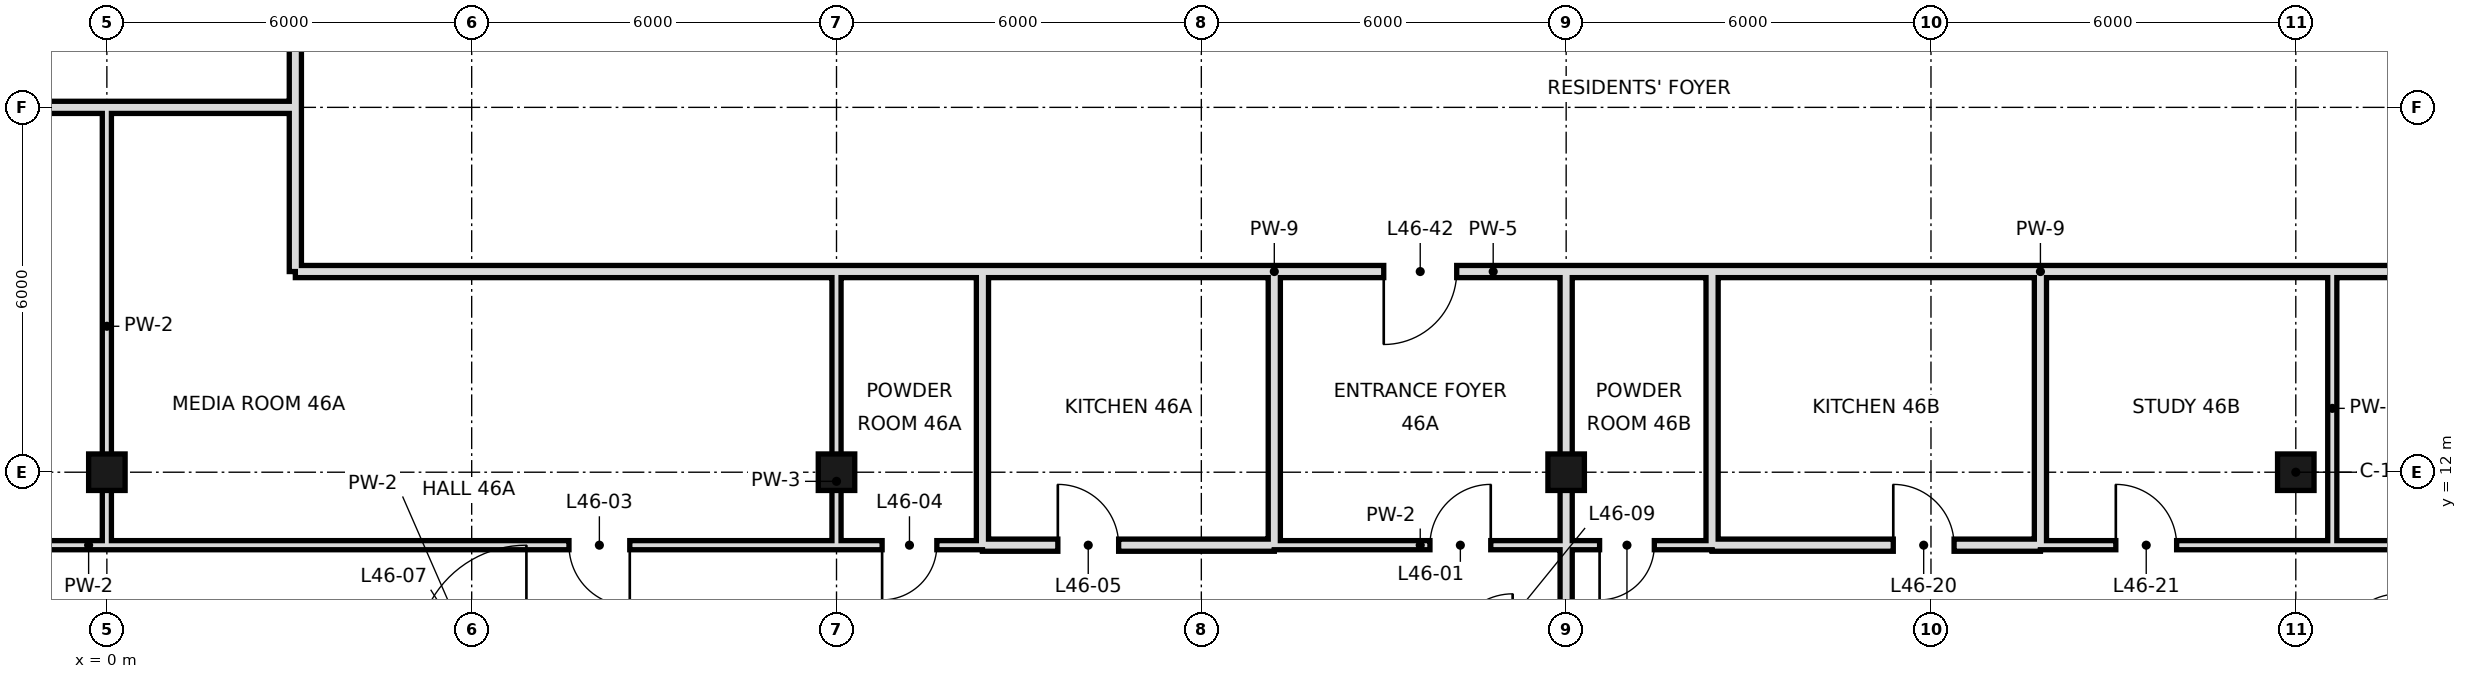
"""IFC4 building model, lengths in metres.
Left out: names, types, materials, properties, quantities, classifications, styles, units other than length and angle.
Written with IfcOpenShell. Run it as: python <this file> out.ifc"""

import sys

from ifc_helpers import new_model, si_unit, direction, frame, frame_2d, origin, origin_2d, place, context, subcontext, project, spatial, rectangle, hollow_rectangle, extrude, element, fill, save


model = new_model("IFC4")
c1 = context("Model", 3, precision=1e-05, world=origin(), true_north=direction((0.0, 1.0)))
c2 = subcontext(c1, "Body", "Model", "MODEL_VIEW")
j1 = project(units=[si_unit("LENGTHUNIT", "METRE"), si_unit("PLANEANGLEUNIT", "RADIAN")], contexts=[c1])
p1 = place(None, origin())
s1 = spatial("IfcSite", under=j1, at=p1, CompositionType="ELEMENT")
p2 = place(p1, origin())
s2 = spatial("IfcBuilding", under=s1, at=p2, CompositionType="ELEMENT")
p3 = place(p2, frame((0.0, 0.0, 199.2)))
s3 = spatial("IfcBuildingStorey", under=s2, at=p3, CompositionType="ELEMENT", Elevation=199.2)
for number, where, z_axis, x_axis in (
    (1, (0.0, 12.0, 0.0), (0.0, 0.0, 1.0), (1.0, 0.0, 0.0)),
    (2, (12.0, 12.0, 0.0), (0.0, 0.0, 1.0), (1.0, 0.0, 0.0)),
    (3, (24.0, 12.0, 0.0), (0.0, 0.0, 1.0), (1.0, 0.0, 0.0)),
    (4, (36.0, 12.0, 0.0), (0.0, 0.0, 1.0), (1.0, 0.0, 0.0)),
):
    element("IfcColumn", number, at=place(p3, frame(where, z_axis=z_axis, x_axis=x_axis)), inside=s3, PredefinedType="COLUMN", context=c2, shape_type="SweptSolid", body=[
        extrude(hollow_rectangle(XDim=0.6, YDim=0.6, WallThickness=0.028, at=origin_2d()), origin(), (0.0, 0.0, 1.0), 3.6),
    ])
p4 = place(p3, frame((0.0, 10.8, 0.0), z_axis=(0.0, 0.0, 1.0), x_axis=(0.0, 1.0, 0.0)))
e5 = element("IfcWall", 5, at=p4, inside=s3, PredefinedType="PARTITIONING", context=c2, shape_type="SweptSolid", body=[
    extrude(rectangle(XDim=7.2, YDim=0.15, at=frame_2d((3.6, 0.0))), origin(), (0.0, 0.0, 1.0), 2.72),
])
p5 = place(p3, frame((12.0, 10.8, 0.0), z_axis=(0.0, 0.0, 1.0), x_axis=(0.0, 1.0, 0.0)))
e6 = element("IfcWall", 6, at=p5, inside=s3, PredefinedType="PARTITIONING", context=c2, shape_type="SweptSolid", body=[
    extrude(rectangle(XDim=4.5, YDim=0.15, at=frame_2d((2.25, 0.0))), origin(), (0.0, 0.0, 1.0), 2.72),
])
for number, where, z_axis, x_axis in (
    (7, (14.4, 10.8, 0.0), (0.0, 0.0, 1.0), (0.0, 1.0, 0.0)),
    (8, (19.2, 10.8, 0.0), (0.0, 0.0, 1.0), (0.0, 1.0, 0.0)),
):
    element("IfcWall", number, at=place(p3, frame(where, z_axis=z_axis, x_axis=x_axis)), inside=s3, PredefinedType="SOLIDWALL", context=c2, shape_type="SweptSolid", body=[
        extrude(rectangle(XDim=4.5, YDim=0.2, at=frame_2d((2.25, 0.0))), origin(), (0.0, 0.0, 1.0), 2.72),
    ])
p6 = place(p3, frame((24.0, 0.0, 0.0), z_axis=(0.0, 0.0, 1.0), x_axis=(0.0, 1.0, 0.0)))
e9 = element("IfcWall", 9, at=p6, inside=s3, PredefinedType="SOLIDWALL", context=c2, shape_type="SweptSolid", body=[
    extrude(rectangle(XDim=15.3, YDim=0.2, at=frame_2d((7.65, 0.0))), origin(), (0.0, 0.0, 1.0), 2.72),
])
p7 = place(p3, frame((26.4, 10.8, 0.0), z_axis=(0.0, 0.0, 1.0), x_axis=(0.0, 1.0, 0.0)))
e10 = element("IfcWall", 10, at=p7, inside=s3, PredefinedType="SOLIDWALL", context=c2, shape_type="SweptSolid", body=[
    extrude(rectangle(XDim=4.5, YDim=0.2, at=frame_2d((2.25, 0.0))), origin(), (0.0, 0.0, 1.0), 2.72),
])
p8 = place(p3, frame((3.1, 15.3, 0.0), z_axis=(0.0, 0.0, 1.0), x_axis=(0.0, 1.0, 0.0)))
e11 = element("IfcWall", 11, at=p8, inside=s3, PredefinedType="SOLIDWALL", context=c2, shape_type="SweptSolid", body=[
    extrude(rectangle(XDim=29.1, YDim=0.2, at=frame_2d((14.55, 0.0))), origin(), (0.0, 0.0, 1.0), 2.97),
])
p9 = place(p8, frame((24.64, 0.0, 0.0)))
e12 = element("IfcOpeningElement", 12, at=p9, cuts=e11, PredefinedType="OPENING", context=c2, shape_type="SweptSolid", body=[
    extrude(rectangle(XDim=1.2, YDim=2.4, at=frame_2d((0.6, 1.2))), frame((0.0, 0.11, 0.0), z_axis=(0.0, -1.0, 0.0), x_axis=(1.0, 0.0, 0.0)), (0.0, 0.0, 1.0), 0.22),
])
p10 = place(p3, frame((31.8, 10.8, 0.0), z_axis=(0.0, 0.0, 1.0), x_axis=(0.0, 1.0, 0.0)))
e13 = element("IfcWall", 13, at=p10, inside=s3, PredefinedType="SOLIDWALL", context=c2, shape_type="SweptSolid", body=[
    extrude(rectangle(XDim=4.5, YDim=0.2, at=frame_2d((2.25, 0.0))), origin(), (0.0, 0.0, 1.0), 3.42),
])
p11 = place(p3, frame((36.6, 10.8, 0.0), z_axis=(0.0, 0.0, 1.0), x_axis=(0.0, 1.0, 0.0)))
e14 = element("IfcWall", 14, at=p11, inside=s3, PredefinedType="PARTITIONING", context=c2, shape_type="SweptSolid", body=[
    extrude(rectangle(XDim=4.5, YDim=0.15, at=frame_2d((2.25, 0.0))), origin(), (0.0, 0.0, 1.0), 3.42),
])
p12 = place(p3, frame((14.4, 10.8, 0.0), z_axis=(0.0, 0.0, 1.0), x_axis=(1.0, 0.0, 0.0)))
e15 = element("IfcWall", 15, at=p12, inside=s3, PredefinedType="SOLIDWALL", context=c2, shape_type="SweptSolid", body=[
    extrude(rectangle(XDim=4.8, YDim=0.2, at=frame_2d((2.4, 0.0))), origin(), (0.0, 0.0, 1.0), 2.72),
])
p13 = place(p12, frame((1.24, 0.0, 0.0)))
e16 = element("IfcOpeningElement", 16, at=p13, cuts=e15, PredefinedType="OPENING", context=c2, shape_type="SweptSolid", body=[
    extrude(rectangle(XDim=1.0, YDim=2.4, at=frame_2d((0.5, 1.2))), frame((0.0, 0.11, 0.0), z_axis=(0.0, -1.0, 0.0), x_axis=(1.0, 0.0, 0.0)), (0.0, 0.0, 1.0), 0.22),
])
p14 = place(p3, frame((26.4, 10.8, 0.0), z_axis=(0.0, 0.0, 1.0), x_axis=(1.0, 0.0, 0.0)))
e17 = element("IfcWall", 17, at=p14, inside=s3, PredefinedType="SOLIDWALL", context=c2, shape_type="SweptSolid", body=[
    extrude(rectangle(XDim=5.4, YDim=0.2, at=frame_2d((2.7, 0.0))), origin(), (0.0, 0.0, 1.0), 2.72),
])
p15 = place(p14, frame((2.98, 0.0, 0.0)))
e18 = element("IfcOpeningElement", 18, at=p15, cuts=e17, PredefinedType="OPENING", context=c2, shape_type="SweptSolid", body=[
    extrude(rectangle(XDim=1.0, YDim=2.4, at=frame_2d((0.5, 1.2))), frame((0.0, 0.11, 0.0), z_axis=(0.0, -1.0, 0.0), x_axis=(1.0, 0.0, 0.0)), (0.0, 0.0, 1.0), 0.22),
])
p16 = place(p3, frame((-12.6, 10.8, 0.0), z_axis=(0.0, 0.0, 1.0), x_axis=(1.0, 0.0, 0.0)))
e19 = element("IfcWall", 19, at=p16, inside=s3, PredefinedType="PARTITIONING", context=c2, shape_type="SweptSolid", body=[
    extrude(rectangle(XDim=24.6, YDim=0.15, at=frame_2d((12.3, 0.0))), origin(), (0.0, 0.0, 1.0), 3.42),
])
p17 = place(p16, frame((10.3, 0.0, 0.0)))
e20 = element("IfcOpeningElement", 20, at=p17, cuts=e19, PredefinedType="OPENING", context=c2, shape_type="SweptSolid", body=[
    extrude(rectangle(XDim=1.0, YDim=2.4, at=frame_2d((0.5, 1.2))), frame((0.0, 0.085, 0.0), z_axis=(0.0, -1.0, 0.0), x_axis=(1.0, 0.0, 0.0)), (0.0, 0.0, 1.0), 0.17),
])
p18 = place(p16, frame((20.2, 0.0, 0.0)))
e21 = element("IfcOpeningElement", 21, at=p18, cuts=e19, PredefinedType="OPENING", context=c2, shape_type="SweptSolid", body=[
    extrude(rectangle(XDim=1.0, YDim=2.4, at=frame_2d((0.5, 1.2))), frame((0.0, 0.085, 0.0), z_axis=(0.0, -1.0, 0.0), x_axis=(1.0, 0.0, 0.0)), (0.0, 0.0, 1.0), 0.17),
])
p19 = place(p3, frame((19.2, 10.8, 0.0), z_axis=(0.0, 0.0, 1.0), x_axis=(1.0, 0.0, 0.0)))
e22 = element("IfcWall", 22, at=p19, inside=s3, PredefinedType="PARTITIONING", context=c2, shape_type="SweptSolid", body=[
    extrude(rectangle(XDim=4.8, YDim=0.15, at=frame_2d((2.4, 0.0))), origin(), (0.0, 0.0, 1.0), 3.42),
])
p20 = place(p19, frame((2.56, 0.0, 0.0)))
e23 = element("IfcOpeningElement", 23, at=p20, cuts=e22, PredefinedType="OPENING", context=c2, shape_type="SweptSolid", body=[
    extrude(rectangle(XDim=1.0, YDim=2.4, at=frame_2d((0.5, 1.2))), frame((0.0, 0.085, 0.0), z_axis=(0.0, -1.0, 0.0), x_axis=(1.0, 0.0, 0.0)), (0.0, 0.0, 1.0), 0.17),
])
p21 = place(p3, frame((31.8, 10.8, 0.0), z_axis=(0.0, 0.0, 1.0), x_axis=(1.0, 0.0, 0.0)))
e24 = element("IfcWall", 24, at=p21, inside=s3, PredefinedType="PARTITIONING", context=c2, shape_type="SweptSolid", body=[
    extrude(rectangle(XDim=22.8, YDim=0.15, at=frame_2d((11.4, 0.0))), origin(), (0.0, 0.0, 1.0), 3.42),
])
p22 = place(p21, frame((8.2, 0.0, 0.0)))
e25 = element("IfcOpeningElement", 25, at=p22, cuts=e24, PredefinedType="OPENING", context=c2, shape_type="SweptSolid", body=[
    extrude(rectangle(XDim=1.0, YDim=2.4, at=frame_2d((0.5, 1.2))), frame((0.0, 0.085, 0.0), z_axis=(0.0, -1.0, 0.0), x_axis=(1.0, 0.0, 0.0)), (0.0, 0.0, 1.0), 0.17),
])
p23 = place(p21, frame((1.24, 0.0, 0.0)))
e26 = element("IfcOpeningElement", 26, at=p23, cuts=e24, PredefinedType="OPENING", context=c2, shape_type="SweptSolid", body=[
    extrude(rectangle(XDim=1.0, YDim=2.4, at=frame_2d((0.5, 1.2))), frame((0.0, 0.085, 0.0), z_axis=(0.0, -1.0, 0.0), x_axis=(1.0, 0.0, 0.0)), (0.0, 0.0, 1.0), 0.17),
])
p24 = place(p21, frame((14.02, 0.0, 0.0)))
e27 = element("IfcOpeningElement", 27, at=p24, cuts=e24, PredefinedType="OPENING", context=c2, shape_type="SweptSolid", body=[
    extrude(rectangle(XDim=1.0, YDim=2.4, at=frame_2d((0.5, 1.2))), frame((0.0, 0.085, 0.0), z_axis=(0.0, -1.0, 0.0), x_axis=(1.0, 0.0, 0.0)), (0.0, 0.0, 1.0), 0.17),
])
p25 = place(p3, frame((12.0, 10.8, 0.0), z_axis=(0.0, 0.0, 1.0), x_axis=(1.0, 0.0, 0.0)))
e28 = element("IfcWall", 28, at=p25, inside=s3, PredefinedType="PARTITIONING", context=c2, shape_type="SweptSolid", body=[
    extrude(rectangle(XDim=2.4, YDim=0.15, at=frame_2d((1.2, 0.0))), origin(), (0.0, 0.0, 1.0), 3.42),
])
p26 = place(p25, frame((0.75, 0.0, 0.0)))
e29 = element("IfcOpeningElement", 29, at=p26, cuts=e28, PredefinedType="OPENING", context=c2, shape_type="SweptSolid", body=[
    extrude(rectangle(XDim=0.9, YDim=2.4, at=frame_2d((0.45, 1.2))), frame((0.0, 0.085, 0.0), z_axis=(0.0, -1.0, 0.0), x_axis=(1.0, 0.0, 0.0)), (0.0, 0.0, 1.0), 0.17),
])
p27 = place(p3, frame((24.0, 10.8, 0.0), z_axis=(0.0, 0.0, 1.0), x_axis=(1.0, 0.0, 0.0)))
e30 = element("IfcWall", 30, at=p27, inside=s3, PredefinedType="PARTITIONING", context=c2, shape_type="SweptSolid", body=[
    extrude(rectangle(XDim=2.4, YDim=0.15, at=frame_2d((1.2, 0.0))), origin(), (0.0, 0.0, 1.0), 3.42),
])
p28 = place(p27, frame((0.55, 0.0, 0.0)))
e31 = element("IfcOpeningElement", 31, at=p28, cuts=e30, PredefinedType="OPENING", context=c2, shape_type="SweptSolid", body=[
    extrude(rectangle(XDim=0.9, YDim=2.4, at=frame_2d((0.45, 1.2))), frame((0.0, 0.085, 0.0), z_axis=(0.0, -1.0, 0.0), x_axis=(1.0, 0.0, 0.0)), (0.0, 0.0, 1.0), 0.17),
])
p29 = place(p3, frame((3.1, 15.3, 0.0), z_axis=(0.0, 0.0, 1.0), x_axis=(1.0, 0.0, 0.0)))
e32 = element("IfcWall", 32, at=p29, inside=s3, PredefinedType="SOLIDWALL", context=c2, shape_type="SweptSolid", body=[
    extrude(rectangle(XDim=11.3, YDim=0.2, at=frame_2d((5.65, 0.0))), origin(), (0.0, 0.0, 1.0), 2.72),
])
p30 = place(p3, frame((19.2, 15.3, 0.0), z_axis=(0.0, 0.0, 1.0), x_axis=(1.0, 0.0, 0.0)))
e33 = element("IfcWall", 33, at=p30, inside=s3, PredefinedType="SOLIDWALL", context=c2, shape_type="SweptSolid", body=[
    extrude(rectangle(XDim=7.2, YDim=0.2, at=frame_2d((3.6, 0.0))), origin(), (0.0, 0.0, 1.0), 3.42),
])
p31 = place(p30, frame((1.8, 0.0, 0.0)))
e34 = element("IfcOpeningElement", 34, at=p31, cuts=e33, PredefinedType="OPENING", context=c2, shape_type="SweptSolid", body=[
    extrude(rectangle(XDim=1.2, YDim=2.4, at=frame_2d((0.6, 1.2))), frame((0.0, 0.11, 0.0), z_axis=(0.0, -1.0, 0.0), x_axis=(1.0, 0.0, 0.0)), (0.0, 0.0, 1.0), 0.22),
])
p32 = place(p3, frame((31.8, 15.3, 0.0), z_axis=(0.0, 0.0, 1.0), x_axis=(1.0, 0.0, 0.0)))
e35 = element("IfcWall", 35, at=p32, inside=s3, PredefinedType="SOLIDWALL", context=c2, shape_type="SweptSolid", body=[
    extrude(rectangle(XDim=13.1, YDim=0.2, at=frame_2d((6.55, 0.0))), origin(), (0.0, 0.0, 1.0), 2.72),
])
p33 = place(p32, frame((8.06, 0.0, 0.0)))
e36 = element("IfcOpeningElement", 36, at=p33, cuts=e35, PredefinedType="OPENING", context=c2, shape_type="SweptSolid", body=[
    extrude(rectangle(XDim=1.2, YDim=2.4, at=frame_2d((0.6, 1.2))), frame((0.0, 0.11, 0.0), z_axis=(0.0, -1.0, 0.0), x_axis=(1.0, 0.0, 0.0)), (0.0, 0.0, 1.0), 0.22),
])
p34 = place(p3, frame((14.4, 15.3, 0.0), z_axis=(0.0, 0.0, 1.0), x_axis=(1.0, 0.0, 0.0)))
e37 = element("IfcWall", 37, at=p34, inside=s3, PredefinedType="SOLIDWALL", context=c2, shape_type="SweptSolid", body=[
    extrude(rectangle(XDim=4.8, YDim=0.2, at=frame_2d((2.4, 0.0))), origin(), (0.0, 0.0, 1.0), 2.72),
])
p35 = place(p3, frame((26.4, 15.3, 0.0), z_axis=(0.0, 0.0, 1.0), x_axis=(1.0, 0.0, 0.0)))
e38 = element("IfcWall", 38, at=p35, inside=s3, PredefinedType="SOLIDWALL", context=c2, shape_type="SweptSolid", body=[
    extrude(rectangle(XDim=5.4, YDim=0.2, at=frame_2d((2.7, 0.0))), origin(), (0.0, 0.0, 1.0), 2.72),
])
p36 = place(p3, frame((-12.6, 18.0, 0.0), z_axis=(0.0, 0.0, 1.0), x_axis=(1.0, 0.0, 0.0)))
e39 = element("IfcWall", 39, at=p36, inside=s3, PredefinedType="SOLIDWALL", context=c2, shape_type="SweptSolid", body=[
    extrude(rectangle(XDim=15.7, YDim=0.2, at=frame_2d((7.85, 0.0))), origin(), (0.0, 0.0, 1.0), 2.72),
])
p37 = place(p20, frame((1.0, 0.0, 0.0), z_axis=(0.0, 0.0, 1.0), x_axis=(-1.0, 0.0, 0.0)))
e40 = element("IfcDoor", 40, at=p37, inside=s3, OperationType="SINGLE_SWING_LEFT", PredefinedType="DOOR", context=c2, shape_type="SweptSolid", body=[
    extrude(rectangle(XDim=1.0, YDim=2.4, at=frame_2d((0.5, 1.2))), frame((0.0, 0.025, 0.0), z_axis=(0.0, -1.0, 0.0), x_axis=(1.0, 0.0, 0.0)), (0.0, 0.0, 1.0), 0.05),
])
fill(e23, e40)
p38 = place(p18, origin())
e41 = element("IfcDoor", 41, at=p38, inside=s3, OperationType="SINGLE_SWING_RIGHT", PredefinedType="DOOR", context=c2, shape_type="SweptSolid", body=[
    extrude(rectangle(XDim=1.0, YDim=2.4, at=frame_2d((0.5, 1.2))), frame((0.0, 0.025, 0.0), z_axis=(0.0, -1.0, 0.0), x_axis=(1.0, 0.0, 0.0)), (0.0, 0.0, 1.0), 0.05),
])
fill(e21, e41)
p39 = place(p26, frame((0.9, 0.0, 0.0), z_axis=(0.0, 0.0, 1.0), x_axis=(-1.0, 0.0, 0.0)))
e42 = element("IfcDoor", 42, at=p39, inside=s3, OperationType="SINGLE_SWING_RIGHT", PredefinedType="DOOR", context=c2, shape_type="SweptSolid", body=[
    extrude(rectangle(XDim=0.9, YDim=2.4, at=frame_2d((0.45, 1.2))), frame((0.0, 0.025, 0.0), z_axis=(0.0, -1.0, 0.0), x_axis=(1.0, 0.0, 0.0)), (0.0, 0.0, 1.0), 0.05),
])
fill(e29, e42)
p40 = place(p13, origin())
e43 = element("IfcDoor", 43, at=p40, inside=s3, OperationType="SINGLE_SWING_LEFT", PredefinedType="DOOR", context=c2, shape_type="SweptSolid", body=[
    extrude(rectangle(XDim=1.0, YDim=2.4, at=frame_2d((0.5, 1.2))), frame((0.0, 0.025, 0.0), z_axis=(0.0, -1.0, 0.0), x_axis=(1.0, 0.0, 0.0)), (0.0, 0.0, 1.0), 0.05),
])
fill(e16, e43)
p41 = place(p28, frame((0.9, 0.0, 0.0), z_axis=(0.0, 0.0, 1.0), x_axis=(-1.0, 0.0, 0.0)))
e44 = element("IfcDoor", 44, at=p41, inside=s3, OperationType="SINGLE_SWING_RIGHT", PredefinedType="DOOR", context=c2, shape_type="SweptSolid", body=[
    extrude(rectangle(XDim=0.9, YDim=2.4, at=frame_2d((0.45, 1.2))), frame((0.0, 0.025, 0.0), z_axis=(0.0, -1.0, 0.0), x_axis=(1.0, 0.0, 0.0)), (0.0, 0.0, 1.0), 0.05),
])
fill(e31, e44)
p42 = place(p15, origin())
e45 = element("IfcDoor", 45, at=p42, inside=s3, OperationType="SINGLE_SWING_LEFT", PredefinedType="DOOR", context=c2, shape_type="SweptSolid", body=[
    extrude(rectangle(XDim=1.0, YDim=2.4, at=frame_2d((0.5, 1.2))), frame((0.0, 0.025, 0.0), z_axis=(0.0, -1.0, 0.0), x_axis=(1.0, 0.0, 0.0)), (0.0, 0.0, 1.0), 0.05),
])
fill(e18, e45)
p43 = place(p23, origin())
e46 = element("IfcDoor", 46, at=p43, inside=s3, OperationType="SINGLE_SWING_LEFT", PredefinedType="DOOR", context=c2, shape_type="SweptSolid", body=[
    extrude(rectangle(XDim=1.0, YDim=2.4, at=frame_2d((0.5, 1.2))), frame((0.0, 0.025, 0.0), z_axis=(0.0, -1.0, 0.0), x_axis=(1.0, 0.0, 0.0)), (0.0, 0.0, 1.0), 0.05),
])
fill(e26, e46)
p44 = place(p31, frame((1.2, 0.0, 0.0), z_axis=(0.0, 0.0, 1.0), x_axis=(-1.0, 0.0, 0.0)))
e47 = element("IfcDoor", 47, at=p44, inside=s3, OperationType="SINGLE_SWING_RIGHT", PredefinedType="DOOR", context=c2, shape_type="SweptSolid", body=[
    extrude(rectangle(XDim=1.2, YDim=2.4, at=frame_2d((0.6, 1.2))), frame((0.0, 0.025, 0.0), z_axis=(0.0, -1.0, 0.0), x_axis=(1.0, 0.0, 0.0)), (0.0, 0.0, 1.0), 0.05),
])
fill(e34, e47)
save(model, sys.argv[1])
